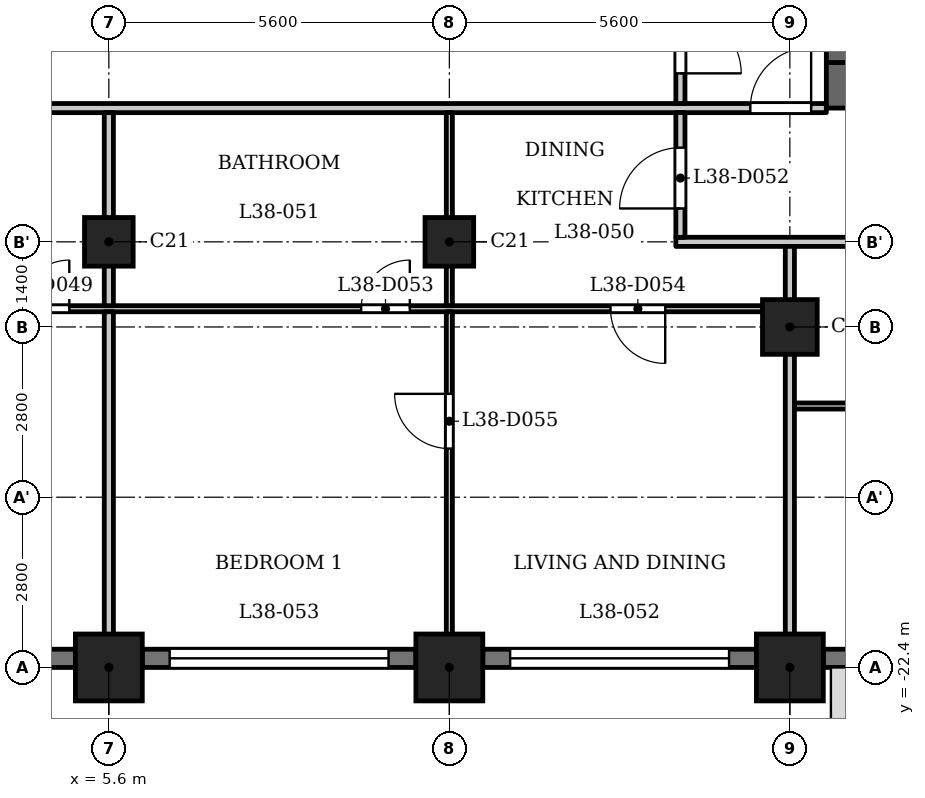
"""IFC4 building model, lengths in metres.
Left out: names, types, materials, properties, quantities, classifications, styles, units other than length and angle.
Written with IfcOpenShell. Run it as: python <this file> out.ifc"""

import sys

from ifc_helpers import new_model, si_unit, direction, frame, frame_2d, origin, origin_2d, place, context, subcontext, project, spatial, rectangle, extrude, element, fill, save


model = new_model("IFC4")
c1 = context("Model", 3, precision=1e-05, world=origin(), true_north=direction((0.0, 1.0)))
c2 = subcontext(c1, "Body", "Model", "MODEL_VIEW")
j1 = project(units=[si_unit("LENGTHUNIT", "METRE"), si_unit("PLANEANGLEUNIT", "RADIAN")], contexts=[c1])
p1 = place(None, origin())
s1 = spatial("IfcSite", under=j1, at=p1, CompositionType="ELEMENT")
p2 = place(p1, origin())
s2 = spatial("IfcBuilding", under=s1, at=p2, CompositionType="ELEMENT")
p3 = place(p2, frame((0.0, 0.0, 150.1)))
s3 = spatial("IfcBuildingStorey", under=s2, at=p3, CompositionType="ELEMENT", Elevation=150.1)
for number, where, z_axis, x_axis in (
    (1, (5.6, -22.4, 0.0), (0.0, 0.0, 1.0), (1.0, 0.0, 0.0)),
    (2, (11.2, -22.4, 0.0), (0.0, 0.0, 1.0), (1.0, 0.0, 0.0)),
    (3, (16.8, -22.4, 0.0), (0.0, 0.0, 1.0), (1.0, 0.0, 0.0)),
):
    element("IfcColumn", number, at=place(p3, frame(where, z_axis=z_axis, x_axis=x_axis)), inside=s3, PredefinedType="COLUMN", context=c2, shape_type="SweptSolid", body=[
        extrude(rectangle(XDim=1.1, YDim=1.1, at=origin_2d()), origin(), (0.0, 0.0, 1.0), 3.5),
    ])
p4 = place(p3, frame((16.8, -16.8, 0.0), z_axis=(0.0, 0.0, 1.0), x_axis=(1.0, 0.0, 0.0)))
e4 = element("IfcColumn", 4, at=p4, inside=s3, PredefinedType="COLUMN", context=c2, shape_type="SweptSolid", body=[
    extrude(rectangle(XDim=0.9, YDim=0.9, at=origin_2d()), origin(), (0.0, 0.0, 1.0), 3.5),
])
for number, where, z_axis, x_axis in (
    (5, (5.6, -15.4, 0.0), (0.0, 0.0, 1.0), (1.0, 0.0, 0.0)),
    (6, (11.2, -15.4, 0.0), (0.0, 0.0, 1.0), (1.0, 0.0, 0.0)),
):
    element("IfcColumn", number, at=place(p3, frame(where, z_axis=z_axis, x_axis=x_axis)), inside=s3, PredefinedType="COLUMN", context=c2, shape_type="SweptSolid", body=[
        extrude(rectangle(XDim=0.8, YDim=0.8, at=origin_2d()), origin(), (0.0, 0.0, 1.0), 3.5),
    ])
p5 = place(p3, frame((0.55, -22.25, 0.0), z_axis=(0.0, 0.0, 1.0), x_axis=(1.0, 0.0, 0.0)))
e7 = element("IfcWall", 7, at=p5, inside=s3, PredefinedType="SOLIDWALL", context=c2, shape_type="SweptSolid", body=[
    extrude(rectangle(XDim=4.5, YDim=0.3, at=frame_2d((2.25, 0.0))), origin(), (0.0, 0.0, 1.0), 2.45),
])
p6 = place(p5, frame((0.45, 0.0, 1.2)))
e8 = element("IfcOpeningElement", 8, at=p6, cuts=e7, PredefinedType="OPENING", context=c2, shape_type="SweptSolid", body=[
    extrude(rectangle(XDim=3.6, YDim=0.95, at=frame_2d((1.8, 0.475))), frame((0.0, 0.16, 0.0), z_axis=(0.0, -1.0, 0.0), x_axis=(1.0, 0.0, 0.0)), (0.0, 0.0, 1.0), 0.32),
])
p7 = place(p3, frame((6.15, -22.25, 0.0), z_axis=(0.0, 0.0, 1.0), x_axis=(1.0, 0.0, 0.0)))
e9 = element("IfcWall", 9, at=p7, inside=s3, PredefinedType="SOLIDWALL", context=c2, shape_type="SweptSolid", body=[
    extrude(rectangle(XDim=4.5, YDim=0.3, at=frame_2d((2.25, 0.0))), origin(), (0.0, 0.0, 1.0), 2.45),
])
p8 = place(p7, frame((0.45, 0.0, 1.2)))
e10 = element("IfcOpeningElement", 10, at=p8, cuts=e9, PredefinedType="OPENING", context=c2, shape_type="SweptSolid", body=[
    extrude(rectangle(XDim=3.6, YDim=0.95, at=frame_2d((1.8, 0.475))), frame((0.0, 0.16, 0.0), z_axis=(0.0, -1.0, 0.0), x_axis=(1.0, 0.0, 0.0)), (0.0, 0.0, 1.0), 0.32),
])
p9 = place(p3, frame((11.75, -22.25, 0.0), z_axis=(0.0, 0.0, 1.0), x_axis=(1.0, 0.0, 0.0)))
e11 = element("IfcWall", 11, at=p9, inside=s3, PredefinedType="SOLIDWALL", context=c2, shape_type="SweptSolid", body=[
    extrude(rectangle(XDim=4.5, YDim=0.3, at=frame_2d((2.25, 0.0))), origin(), (0.0, 0.0, 1.0), 2.45),
])
p10 = place(p9, frame((0.45, 0.0, 1.2)))
e12 = element("IfcOpeningElement", 12, at=p10, cuts=e11, PredefinedType="OPENING", context=c2, shape_type="SweptSolid", body=[
    extrude(rectangle(XDim=3.6, YDim=0.95, at=frame_2d((1.8, 0.475))), frame((0.0, 0.16, 0.0), z_axis=(0.0, -1.0, 0.0), x_axis=(1.0, 0.0, 0.0)), (0.0, 0.0, 1.0), 0.32),
])
p11 = place(p3, frame((17.35, -22.25, 0.0), z_axis=(0.0, 0.0, 1.0), x_axis=(1.0, 0.0, 0.0)))
e13 = element("IfcWall", 13, at=p11, inside=s3, PredefinedType="SOLIDWALL", context=c2, shape_type="SweptSolid", body=[
    extrude(rectangle(XDim=2.65, YDim=0.3, at=frame_2d((1.325, 0.0))), origin(), (0.0, 0.0, 1.0), 2.45),
])
p12 = place(p11, frame((0.425, 0.0, 0.9)))
e14 = element("IfcOpeningElement", 14, at=p12, cuts=e13, PredefinedType="OPENING", context=c2, shape_type="SweptSolid", body=[
    extrude(rectangle(XDim=1.8, YDim=1.25, at=frame_2d((0.9, 0.625))), frame((0.0, 0.16, 0.0), z_axis=(0.0, -1.0, 0.0), x_axis=(1.0, 0.0, 0.0)), (0.0, 0.0, 1.0), 0.32),
])
p13 = place(p3, frame((17.4, -12.825, 0.0), z_axis=(0.0, 0.0, 1.0), x_axis=(1.0, 0.0, 0.0)))
e15 = element("IfcWall", 15, at=p13, inside=s3, PredefinedType="SHEAR", context=c2, shape_type="SweptSolid", body=[
    extrude(rectangle(XDim=10.4, YDim=0.75, at=frame_2d((5.2, 0.0))), origin(), (0.0, 0.0, 1.0), 3.2),
])
p14 = place(p3, frame((17.6, -12.45, 0.0), z_axis=(0.0, 0.0, 1.0), x_axis=(0.0, 1.0, 0.0)))
e16 = element("IfcWall", 16, at=p14, inside=s3, PredefinedType="SHEAR", context=c2, shape_type="SweptSolid", body=[
    extrude(rectangle(XDim=24.9, YDim=0.4, at=frame_2d((12.45, 0.0))), origin(), (0.0, 0.0, 1.0), 3.2),
])
p15 = place(p14, frame((6.325, 0.0, 0.0)))
e17 = element("IfcOpeningElement", 17, at=p15, cuts=e16, PredefinedType="OPENING", context=c2, shape_type="SweptSolid", body=[
    extrude(rectangle(XDim=0.9, YDim=2.1, at=frame_2d((0.45, 1.05))), frame((0.0, 0.21, 0.0), z_axis=(0.0, -1.0, 0.0), x_axis=(1.0, 0.0, 0.0)), (0.0, 0.0, 1.0), 0.42),
])
p16 = place(p14, frame((9.925, 0.0, 0.0)))
e18 = element("IfcOpeningElement", 18, at=p16, cuts=e16, PredefinedType="OPENING", context=c2, shape_type="SweptSolid", body=[
    extrude(rectangle(XDim=0.9, YDim=2.1, at=frame_2d((0.45, 1.05))), frame((0.0, 0.21, 0.0), z_axis=(0.0, -1.0, 0.0), x_axis=(1.0, 0.0, 0.0)), (0.0, 0.0, 1.0), 0.42),
])
p17 = place(p14, frame((15.6, 0.0, 0.0)))
e19 = element("IfcOpeningElement", 19, at=p17, cuts=e16, PredefinedType="OPENING", context=c2, shape_type="SweptSolid", body=[
    extrude(rectangle(XDim=1.1, YDim=2.1, at=frame_2d((0.55, 1.05))), frame((0.0, 0.21, 0.0), z_axis=(0.0, -1.0, 0.0), x_axis=(1.0, 0.0, 0.0)), (0.0, 0.0, 1.0), 0.42),
])
p18 = place(p14, frame((18.0, 0.0, 0.0)))
e20 = element("IfcOpeningElement", 20, at=p18, cuts=e16, PredefinedType="OPENING", context=c2, shape_type="SweptSolid", body=[
    extrude(rectangle(XDim=1.1, YDim=2.1, at=frame_2d((0.55, 1.05))), frame((0.0, 0.21, 0.0), z_axis=(0.0, -1.0, 0.0), x_axis=(1.0, 0.0, 0.0)), (0.0, 0.0, 1.0), 0.42),
])
p19 = place(p14, frame((23.025, 0.0, 0.0)))
e21 = element("IfcOpeningElement", 21, at=p19, cuts=e16, PredefinedType="OPENING", context=c2, shape_type="SweptSolid", body=[
    extrude(rectangle(XDim=1.1, YDim=2.1, at=frame_2d((0.55, 1.05))), frame((0.0, 0.21, 0.0), z_axis=(0.0, -1.0, 0.0), x_axis=(1.0, 0.0, 0.0)), (0.0, 0.0, 1.0), 0.42),
])
p20 = place(p14, frame((0.775, 0.0, 0.0)))
e22 = element("IfcOpeningElement", 22, at=p20, cuts=e16, PredefinedType="OPENING", context=c2, shape_type="SweptSolid", body=[
    extrude(rectangle(XDim=1.1, YDim=2.1, at=frame_2d((0.55, 1.05))), frame((0.0, 0.21, 0.0), z_axis=(0.0, -1.0, 0.0), x_axis=(1.0, 0.0, 0.0)), (0.0, 0.0, 1.0), 0.42),
])
p21 = place(p14, frame((12.925, 0.0, 0.0)))
e23 = element("IfcOpeningElement", 23, at=p21, cuts=e16, PredefinedType="OPENING", context=c2, shape_type="SweptSolid", body=[
    extrude(rectangle(XDim=1.8, YDim=2.1, at=frame_2d((0.9, 1.05))), frame((0.0, 0.21, 0.0), z_axis=(0.0, -1.0, 0.0), x_axis=(1.0, 0.0, 0.0)), (0.0, 0.0, 1.0), 0.42),
])
p22 = place(p3, frame((16.875, -18.1, 0.0), z_axis=(0.0, 0.0, 1.0), x_axis=(1.0, 0.0, 0.0)))
e24 = element("IfcWall", 24, at=p22, inside=s3, PredefinedType="PARTITIONING", context=c2, shape_type="SweptSolid", body=[
    extrude(rectangle(XDim=9.565, YDim=0.1, at=frame_2d((4.782, 0.0))), origin(), (0.0, 0.0, 1.0), 3.2),
])
p23 = place(p22, frame((7.639, 0.0, 0.0)))
e25 = element("IfcOpeningElement", 25, at=p23, cuts=e24, PredefinedType="OPENING", context=c2, shape_type="SweptSolid", body=[
    extrude(rectangle(XDim=0.8, YDim=2.1, at=frame_2d((0.4, 1.05))), frame((0.0, 0.06, 0.0), z_axis=(0.0, -1.0, 0.0), x_axis=(1.0, 0.0, 0.0)), (0.0, 0.0, 1.0), 0.12),
])
p24 = place(p22, frame((4.075, 0.0, 0.0)))
e26 = element("IfcOpeningElement", 26, at=p24, cuts=e24, PredefinedType="OPENING", context=c2, shape_type="SweptSolid", body=[
    extrude(rectangle(XDim=0.9, YDim=2.1, at=frame_2d((0.45, 1.05))), frame((0.0, 0.06, 0.0), z_axis=(0.0, -1.0, 0.0), x_axis=(1.0, 0.0, 0.0)), (0.0, 0.0, 1.0), 0.12),
])
p25 = place(p3, frame((-16.725, -16.5, 0.0), z_axis=(0.0, 0.0, 1.0), x_axis=(1.0, 0.0, 0.0)))
e27 = element("IfcWall", 27, at=p25, inside=s3, PredefinedType="PARTITIONING", context=c2, shape_type="SweptSolid", body=[
    extrude(rectangle(XDim=33.45, YDim=0.1, at=frame_2d((16.725, 0.0))), origin(), (0.0, 0.0, 1.0), 3.2),
])
p26 = place(p25, frame((9.675, 0.0, 0.0)))
e28 = element("IfcOpeningElement", 28, at=p26, cuts=e27, PredefinedType="OPENING", context=c2, shape_type="SweptSolid", body=[
    extrude(rectangle(XDim=0.8, YDim=2.1, at=frame_2d((0.4, 1.05))), frame((0.0, 0.06, 0.0), z_axis=(0.0, -1.0, 0.0), x_axis=(1.0, 0.0, 0.0)), (0.0, 0.0, 1.0), 0.12),
])
p27 = place(p25, frame((4.075, 0.0, 0.0)))
e29 = element("IfcOpeningElement", 29, at=p27, cuts=e27, PredefinedType="OPENING", context=c2, shape_type="SweptSolid", body=[
    extrude(rectangle(XDim=0.9, YDim=2.1, at=frame_2d((0.45, 1.05))), frame((0.0, 0.06, 0.0), z_axis=(0.0, -1.0, 0.0), x_axis=(1.0, 0.0, 0.0)), (0.0, 0.0, 1.0), 0.12),
])
p28 = place(p25, frame((20.875, 0.0, 0.0)))
e30 = element("IfcOpeningElement", 30, at=p28, cuts=e27, PredefinedType="OPENING", context=c2, shape_type="SweptSolid", body=[
    extrude(rectangle(XDim=0.8, YDim=2.1, at=frame_2d((0.4, 1.05))), frame((0.0, 0.06, 0.0), z_axis=(0.0, -1.0, 0.0), x_axis=(1.0, 0.0, 0.0)), (0.0, 0.0, 1.0), 0.12),
])
p29 = place(p25, frame((15.275, 0.0, 0.0)))
e31 = element("IfcOpeningElement", 31, at=p29, cuts=e27, PredefinedType="OPENING", context=c2, shape_type="SweptSolid", body=[
    extrude(rectangle(XDim=0.9, YDim=2.1, at=frame_2d((0.45, 1.05))), frame((0.0, 0.06, 0.0), z_axis=(0.0, -1.0, 0.0), x_axis=(1.0, 0.0, 0.0)), (0.0, 0.0, 1.0), 0.12),
])
p30 = place(p25, frame((26.475, 0.0, 0.0)))
e32 = element("IfcOpeningElement", 32, at=p30, cuts=e27, PredefinedType="OPENING", context=c2, shape_type="SweptSolid", body=[
    extrude(rectangle(XDim=0.8, YDim=2.1, at=frame_2d((0.4, 1.05))), frame((0.0, 0.06, 0.0), z_axis=(0.0, -1.0, 0.0), x_axis=(1.0, 0.0, 0.0)), (0.0, 0.0, 1.0), 0.12),
])
p31 = place(p25, frame((30.575, 0.0, 0.0)))
e33 = element("IfcOpeningElement", 33, at=p31, cuts=e27, PredefinedType="OPENING", context=c2, shape_type="SweptSolid", body=[
    extrude(rectangle(XDim=0.9, YDim=2.1, at=frame_2d((0.45, 1.05))), frame((0.0, 0.06, 0.0), z_axis=(0.0, -1.0, 0.0), x_axis=(1.0, 0.0, 0.0)), (0.0, 0.0, 1.0), 0.12),
])
p32 = place(p3, frame((14.925, -15.4, 0.0), z_axis=(0.0, 0.0, 1.0), x_axis=(1.0, 0.0, 0.0)))
e34 = element("IfcWall", 34, at=p32, inside=s3, PredefinedType="PARTITIONING", context=c2, shape_type="SweptSolid", body=[
    extrude(rectangle(XDim=12.559, YDim=0.15, at=frame_2d((6.279, 0.0))), origin(), (0.0, 0.0, 1.0), 3.2),
])
p33 = place(p32, frame((5.775, 0.0, 0.0)))
e35 = element("IfcOpeningElement", 35, at=p33, cuts=e34, PredefinedType="OPENING", context=c2, shape_type="SweptSolid", body=[
    extrude(rectangle(XDim=1.0, YDim=2.1, at=frame_2d((0.5, 1.05))), frame((0.0, 0.085, 0.0), z_axis=(0.0, -1.0, 0.0), x_axis=(1.0, 0.0, 0.0)), (0.0, 0.0, 1.0), 0.17),
])
p34 = place(p3, frame((-17.4, -13.2, 0.0), z_axis=(0.0, 0.0, 1.0), x_axis=(1.0, 0.0, 0.0)))
e36 = element("IfcWall", 36, at=p34, inside=s3, PredefinedType="PARTITIONING", context=c2, shape_type="SweptSolid", body=[
    extrude(rectangle(XDim=34.8, YDim=0.15, at=frame_2d((17.4, 0.0))), origin(), (0.0, 0.0, 1.0), 3.2),
])
p35 = place(p34, frame((0.15, 0.0, 0.0)))
e37 = element("IfcOpeningElement", 37, at=p35, cuts=e36, PredefinedType="OPENING", context=c2, shape_type="SweptSolid", body=[
    extrude(rectangle(XDim=1.0, YDim=2.1, at=frame_2d((0.5, 1.05))), frame((0.0, 0.085, 0.0), z_axis=(0.0, -1.0, 0.0), x_axis=(1.0, 0.0, 0.0)), (0.0, 0.0, 1.0), 0.17),
])
p36 = place(p34, frame((33.55, 0.0, 0.0)))
e38 = element("IfcOpeningElement", 38, at=p36, cuts=e36, PredefinedType="OPENING", context=c2, shape_type="SweptSolid", body=[
    extrude(rectangle(XDim=1.0, YDim=2.1, at=frame_2d((0.5, 1.05))), frame((0.0, 0.085, 0.0), z_axis=(0.0, -1.0, 0.0), x_axis=(1.0, 0.0, 0.0)), (0.0, 0.0, 1.0), 0.17),
])
p37 = place(p34, frame((15.7, 0.0, 0.0)))
e39 = element("IfcOpeningElement", 39, at=p37, cuts=e36, PredefinedType="OPENING", context=c2, shape_type="SweptSolid", body=[
    extrude(rectangle(XDim=1.0, YDim=2.1, at=frame_2d((0.5, 1.05))), frame((0.0, 0.085, 0.0), z_axis=(0.0, -1.0, 0.0), x_axis=(1.0, 0.0, 0.0)), (0.0, 0.0, 1.0), 0.17),
])
p38 = place(p3, frame((5.6, -22.93, 0.0), z_axis=(0.0, 0.0, 1.0), x_axis=(0.0, 1.0, 0.0)))
e40 = element("IfcWall", 40, at=p38, inside=s3, PredefinedType="PARTITIONING", context=c2, shape_type="SweptSolid", body=[
    extrude(rectangle(XDim=6.38, YDim=0.15, at=frame_2d((3.19, 0.0))), origin(), (0.0, 0.0, 1.0), 3.2),
])
p39 = place(p3, frame((5.6, -16.45, 0.0), z_axis=(0.0, 0.0, 1.0), x_axis=(0.0, 1.0, 0.0)))
e41 = element("IfcWall", 41, at=p39, inside=s3, PredefinedType="PARTITIONING", context=c2, shape_type="SweptSolid", body=[
    extrude(rectangle(XDim=3.175, YDim=0.15, at=frame_2d((1.587, 0.0))), origin(), (0.0, 0.0, 1.0), 3.2),
])
p40 = place(p3, frame((11.2, -22.93, 0.0), z_axis=(0.0, 0.0, 1.0), x_axis=(0.0, 1.0, 0.0)))
e42 = element("IfcWall", 42, at=p40, inside=s3, PredefinedType="PARTITIONING", context=c2, shape_type="SweptSolid", body=[
    extrude(rectangle(XDim=6.38, YDim=0.1, at=frame_2d((3.19, 0.0))), origin(), (0.0, 0.0, 1.0), 3.2),
])
p41 = place(p40, frame((4.13, 0.0, 0.0)))
e43 = element("IfcOpeningElement", 43, at=p41, cuts=e42, PredefinedType="OPENING", context=c2, shape_type="SweptSolid", body=[
    extrude(rectangle(XDim=0.9, YDim=2.1, at=frame_2d((0.45, 1.05))), frame((0.0, 0.06, 0.0), z_axis=(0.0, -1.0, 0.0), x_axis=(1.0, 0.0, 0.0)), (0.0, 0.0, 1.0), 0.12),
])
p42 = place(p3, frame((11.2, -16.45, 0.0), z_axis=(0.0, 0.0, 1.0), x_axis=(0.0, 1.0, 0.0)))
e44 = element("IfcWall", 44, at=p42, inside=s3, PredefinedType="PARTITIONING", context=c2, shape_type="SweptSolid", body=[
    extrude(rectangle(XDim=3.175, YDim=0.1, at=frame_2d((1.587, 0.0))), origin(), (0.0, 0.0, 1.0), 3.2),
])
p43 = place(p3, frame((15.0, -15.325, 0.0), z_axis=(0.0, 0.0, 1.0), x_axis=(0.0, 1.0, 0.0)))
e45 = element("IfcWall", 45, at=p43, inside=s3, PredefinedType="PARTITIONING", context=c2, shape_type="SweptSolid", body=[
    extrude(rectangle(XDim=2.05, YDim=0.15, at=frame_2d((1.025, 0.0))), origin(), (0.0, 0.0, 1.0), 3.2),
])
p44 = place(p43, frame((0.474, 0.0, 0.0)))
e46 = element("IfcOpeningElement", 46, at=p44, cuts=e45, PredefinedType="OPENING", context=c2, shape_type="SweptSolid", body=[
    extrude(rectangle(XDim=1.0, YDim=2.1, at=frame_2d((0.5, 1.05))), frame((0.0, 0.085, 0.0), z_axis=(0.0, -1.0, 0.0), x_axis=(1.0, 0.0, 0.0)), (0.0, 0.0, 1.0), 0.17),
])
p45 = place(p3, frame((15.0, -13.125, 0.0), z_axis=(0.0, 0.0, 1.0), x_axis=(0.0, 1.0, 0.0)))
e47 = element("IfcWall", 47, at=p45, inside=s3, PredefinedType="PARTITIONING", context=c2, shape_type="SweptSolid", body=[
    extrude(rectangle(XDim=6.356, YDim=0.15, at=frame_2d((3.178, 0.0))), origin(), (0.0, 0.0, 1.0), 3.2),
])
p46 = place(p45, frame((0.496, 0.0, 0.0)))
e48 = element("IfcOpeningElement", 48, at=p46, cuts=e47, PredefinedType="OPENING", context=c2, shape_type="SweptSolid", body=[
    extrude(rectangle(XDim=1.0, YDim=2.1, at=frame_2d((0.5, 1.05))), frame((0.0, 0.085, 0.0), z_axis=(0.0, -1.0, 0.0), x_axis=(1.0, 0.0, 0.0)), (0.0, 0.0, 1.0), 0.17),
])
p47 = place(p3, frame((16.8, -22.93, 0.0), z_axis=(0.0, 0.0, 1.0), x_axis=(0.0, 1.0, 0.0)))
e49 = element("IfcWall", 49, at=p47, inside=s3, PredefinedType="PARTITIONING", context=c2, shape_type="SweptSolid", body=[
    extrude(rectangle(XDim=7.455, YDim=0.15, at=frame_2d((3.728, 0.0))), origin(), (0.0, 0.0, 1.0), 3.2),
])
p48 = place(p46, origin())
e50 = element("IfcDoor", 50, at=p48, inside=s3, OperationType="SINGLE_SWING_LEFT", PredefinedType="DOOR", context=c2, shape_type="SweptSolid", body=[
    extrude(rectangle(XDim=1.0, YDim=2.1, at=frame_2d((0.5, 1.05))), frame((0.0, 0.025, 0.0), z_axis=(0.0, -1.0, 0.0), x_axis=(1.0, 0.0, 0.0)), (0.0, 0.0, 1.0), 0.05),
])
fill(e48, e50)
p49 = place(p36, origin())
e51 = element("IfcDoor", 51, at=p49, inside=s3, OperationType="SINGLE_SWING_LEFT", PredefinedType="DOOR", context=c2, shape_type="SweptSolid", body=[
    extrude(rectangle(XDim=1.0, YDim=2.1, at=frame_2d((0.5, 1.05))), frame((0.0, 0.025, 0.0), z_axis=(0.0, -1.0, 0.0), x_axis=(1.0, 0.0, 0.0)), (0.0, 0.0, 1.0), 0.05),
])
fill(e38, e51)
p50 = place(p28, origin())
e52 = element("IfcDoor", 52, at=p50, inside=s3, OperationType="SINGLE_SWING_LEFT", PredefinedType="DOOR", context=c2, shape_type="SweptSolid", body=[
    extrude(rectangle(XDim=0.8, YDim=2.1, at=frame_2d((0.4, 1.05))), frame((0.0, 0.025, 0.0), z_axis=(0.0, -1.0, 0.0), x_axis=(1.0, 0.0, 0.0)), (0.0, 0.0, 1.0), 0.05),
])
fill(e30, e52)
p51 = place(p44, origin())
e53 = element("IfcDoor", 53, at=p51, inside=s3, OperationType="SINGLE_SWING_RIGHT", PredefinedType="DOOR", context=c2, shape_type="SweptSolid", body=[
    extrude(rectangle(XDim=1.0, YDim=2.1, at=frame_2d((0.5, 1.05))), frame((0.0, 0.025, 0.0), z_axis=(0.0, -1.0, 0.0), x_axis=(1.0, 0.0, 0.0)), (0.0, 0.0, 1.0), 0.05),
])
fill(e46, e53)
p52 = place(p30, origin())
e54 = element("IfcDoor", 54, at=p52, inside=s3, OperationType="SINGLE_SWING_LEFT", PredefinedType="DOOR", context=c2, shape_type="SweptSolid", body=[
    extrude(rectangle(XDim=0.8, YDim=2.1, at=frame_2d((0.4, 1.05))), frame((0.0, 0.025, 0.0), z_axis=(0.0, -1.0, 0.0), x_axis=(1.0, 0.0, 0.0)), (0.0, 0.0, 1.0), 0.05),
])
fill(e32, e54)
p53 = place(p31, origin())
e55 = element("IfcDoor", 55, at=p53, inside=s3, OperationType="SINGLE_SWING_RIGHT", PredefinedType="DOOR", context=c2, shape_type="SweptSolid", body=[
    extrude(rectangle(XDim=0.9, YDim=2.1, at=frame_2d((0.45, 1.05))), frame((0.0, 0.025, 0.0), z_axis=(0.0, -1.0, 0.0), x_axis=(1.0, 0.0, 0.0)), (0.0, 0.0, 1.0), 0.05),
])
fill(e33, e55)
p54 = place(p41, origin())
e56 = element("IfcDoor", 56, at=p54, inside=s3, OperationType="SINGLE_SWING_LEFT", PredefinedType="DOOR", context=c2, shape_type="SweptSolid", body=[
    extrude(rectangle(XDim=0.9, YDim=2.1, at=frame_2d((0.45, 1.05))), frame((0.0, 0.025, 0.0), z_axis=(0.0, -1.0, 0.0), x_axis=(1.0, 0.0, 0.0)), (0.0, 0.0, 1.0), 0.05),
])
fill(e43, e56)
p55 = place(p8, origin())
e57 = element("IfcWindow", 57, at=p55, inside=s3, PartitioningType="SINGLE_PANEL", PredefinedType="WINDOW", context=c2, shape_type="SweptSolid", body=[
    extrude(rectangle(XDim=3.6, YDim=0.95, at=frame_2d((1.8, 0.475))), frame((0.0, 0.03, 0.0), z_axis=(0.0, -1.0, 0.0), x_axis=(1.0, 0.0, 0.0)), (0.0, 0.0, 1.0), 0.06),
])
fill(e10, e57)
p56 = place(p10, origin())
e58 = element("IfcWindow", 58, at=p56, inside=s3, PartitioningType="SINGLE_PANEL", PredefinedType="WINDOW", context=c2, shape_type="SweptSolid", body=[
    extrude(rectangle(XDim=3.6, YDim=0.95, at=frame_2d((1.8, 0.475))), frame((0.0, 0.03, 0.0), z_axis=(0.0, -1.0, 0.0), x_axis=(1.0, 0.0, 0.0)), (0.0, 0.0, 1.0), 0.06),
])
fill(e12, e58)
save(model, sys.argv[1])
